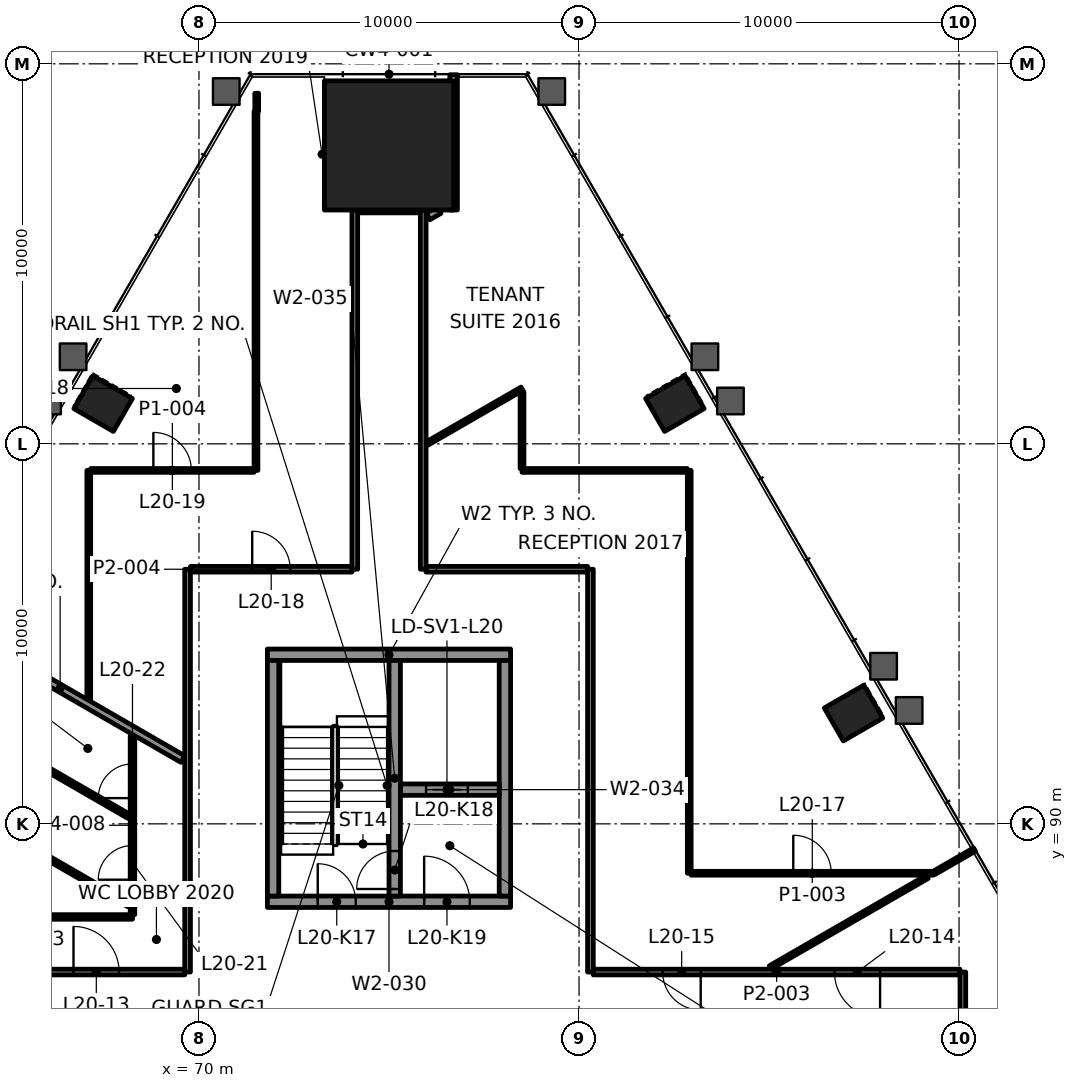
"""IFC4 building model, lengths in metres.
Left out: names, types, materials, properties, quantities, classifications, styles, units other than length and angle.
Written with IfcOpenShell. Run it as: python <this file> out.ifc"""

import sys

from ifc_helpers import new_model, si_unit, direction, frame, frame_2d, origin, origin_2d, place, context, subcontext, project, spatial, rectangle, extrude, element, fill, save


model = new_model("IFC4")
c1 = context("Model", 3, precision=1e-05, world=origin(), true_north=direction((0.0, 1.0)))
c2 = subcontext(c1, "Body", "Model", "MODEL_VIEW")
j1 = project(units=[si_unit("LENGTHUNIT", "METRE"), si_unit("PLANEANGLEUNIT", "RADIAN")], contexts=[c1])
p1 = place(None, origin())
s1 = spatial("IfcSite", under=j1, at=p1, CompositionType="ELEMENT")
p2 = place(p1, origin())
s2 = spatial("IfcBuilding", under=s1, at=p2, CompositionType="ELEMENT")
p3 = place(p2, frame((0.0, 0.0, 90.4)))
s3 = spatial("IfcBuildingStorey", under=s2, at=p3, CompositionType="ELEMENT", Elevation=90.4)
p4 = place(p3, frame((75.0, 107.853, 0.0), z_axis=(0.0, 0.0, 1.0), x_axis=(-1.0, 0.0, 0.0)))
e1 = element("IfcColumn", 1, at=p4, inside=s3, PredefinedType="COLUMN", context=c2, shape_type="SweptSolid", body=[
    extrude(rectangle(XDim=3.4, YDim=3.4, at=origin_2d()), origin(), (0.0, 0.0, 1.0), 4.2),
])
for number, where, z_axis, x_axis in (
    (2, (87.224, 92.916, -0.0), (0.0, 0.0, 1.0), (-0.5, 0.866, 0.0)),
    (3, (82.522, 101.059, -0.0), (0.0, 0.0, 1.0), (-0.5, 0.866, 0.0)),
    (4, (67.478, 101.059, -0.0), (0.0, 0.0, 1.0), (-0.5, -0.866, 0.0)),
):
    element("IfcColumn", number, at=place(p3, frame(where, z_axis=z_axis, x_axis=x_axis)), inside=s3, PredefinedType="COLUMN", context=c2, shape_type="SweptSolid", body=[
        extrude(rectangle(XDim=1.0, YDim=1.2, at=origin_2d()), origin(), (0.0, 0.0, 1.0), 4.2),
    ])
p5 = place(p3, frame((71.8, 87.95, 0.0), z_axis=(0.0, 0.0, 1.0), x_axis=(1.0, 0.0, 0.0)))
e5 = element("IfcWall", 5, at=p5, inside=s3, PredefinedType="SHEAR", context=c2, shape_type="SweptSolid", body=[
    extrude(rectangle(XDim=6.4, YDim=0.3, at=frame_2d((3.2, 0.0))), origin(), (0.0, 0.0, 1.0), 4.0),
])
p6 = place(p5, frame((1.325, 0.0, 0.0)))
e6 = element("IfcOpeningElement", 6, at=p6, cuts=e5, PredefinedType="OPENING", context=c2, shape_type="SweptSolid", body=[
    extrude(rectangle(XDim=1.0, YDim=2.1, at=frame_2d((0.5, 1.05))), frame((0.0, 0.16, 0.0), z_axis=(0.0, -1.0, 0.0), x_axis=(1.0, 0.0, 0.0)), (0.0, 0.0, 1.0), 0.32),
])
p7 = place(p5, frame((4.125, 0.0, 0.0)))
e7 = element("IfcOpeningElement", 7, at=p7, cuts=e5, PredefinedType="OPENING", context=c2, shape_type="SweptSolid", body=[
    extrude(rectangle(XDim=1.2, YDim=2.1, at=frame_2d((0.6, 1.05))), frame((0.0, 0.16, 0.0), z_axis=(0.0, -1.0, 0.0), x_axis=(1.0, 0.0, 0.0)), (0.0, 0.0, 1.0), 0.32),
])
p8 = place(p3, frame((71.8, 94.45, 0.0), z_axis=(0.0, 0.0, 1.0), x_axis=(1.0, 0.0, 0.0)))
e8 = element("IfcWall", 8, at=p8, inside=s3, PredefinedType="SHEAR", context=c2, shape_type="SweptSolid", body=[
    extrude(rectangle(XDim=6.4, YDim=0.3, at=frame_2d((3.2, 0.0))), origin(), (0.0, 0.0, 1.0), 4.0),
])
for number, where, z_axis, x_axis in (
    (9, (71.95, 88.1, 0.0), (0.0, 0.0, 1.0), (0.0, 1.0, 0.0)),
    (10, (78.05, 88.1, 0.0), (0.0, 0.0, 1.0), (0.0, 1.0, 0.0)),
):
    element("IfcWall", number, at=place(p3, frame(where, z_axis=z_axis, x_axis=x_axis)), inside=s3, PredefinedType="SHEAR", context=c2, shape_type="SweptSolid", body=[
        extrude(rectangle(XDim=6.2, YDim=0.3, at=frame_2d((3.1, 0.0))), origin(), (0.0, 0.0, 1.0), 4.0),
    ])
p9 = place(p3, frame((75.3, 90.9, 0.0), z_axis=(0.0, 0.0, 1.0), x_axis=(1.0, 0.0, 0.0)))
e11 = element("IfcWall", 11, at=p9, inside=s3, PredefinedType="SHEAR", context=c2, shape_type="SweptSolid", body=[
    extrude(rectangle(XDim=2.6, YDim=0.3, at=frame_2d((1.3, 0.0))), origin(), (0.0, 0.0, 1.0), 4.0),
])
p10 = place(p9, frame((0.675, 0.0, 0.0)))
e12 = element("IfcOpeningElement", 12, at=p10, cuts=e11, PredefinedType="OPENING", context=c2, shape_type="SweptSolid", body=[
    extrude(rectangle(XDim=1.1, YDim=2.1, at=frame_2d((0.55, 1.05))), frame((0.0, 0.16, 0.0), z_axis=(0.0, -1.0, 0.0), x_axis=(1.0, 0.0, 0.0)), (0.0, 0.0, 1.0), 0.32),
])
p11 = place(p3, frame((75.15, 88.1, 0.0), z_axis=(0.0, 0.0, 1.0), x_axis=(0.0, 1.0, 0.0)))
e13 = element("IfcWall", 13, at=p11, inside=s3, PredefinedType="SHEAR", context=c2, shape_type="SweptSolid", body=[
    extrude(rectangle(XDim=6.2, YDim=0.3, at=frame_2d((3.1, 0.0))), origin(), (0.0, 0.0, 1.0), 4.0),
])
p12 = place(p11, frame((0.185, 0.0, 0.0)))
e14 = element("IfcOpeningElement", 14, at=p12, cuts=e13, PredefinedType="OPENING", context=c2, shape_type="SweptSolid", body=[
    extrude(rectangle(XDim=1.0, YDim=2.1, at=frame_2d((0.5, 1.05))), frame((0.0, 0.16, 0.0), z_axis=(0.0, -1.0, 0.0), x_axis=(1.0, 0.0, 0.0)), (0.0, 0.0, 1.0), 0.32),
])
p13 = place(p3, frame((59.976, 86.1, 0.0), z_axis=(0.0, 0.0, 1.0), x_axis=(1.0, 0.0, 0.0)))
e15 = element("IfcWall", 15, at=p13, inside=s3, PredefinedType="PARTITIONING", context=c2, shape_type="SweptSolid", body=[
    extrude(rectangle(XDim=9.649, YDim=0.15, at=frame_2d((4.825, 0.0))), origin(), (0.0, 0.0, 1.0), 3.4),
])
p14 = place(p13, frame((2.252, 0.0, 0.0)))
e16 = element("IfcOpeningElement", 16, at=p14, cuts=e15, PredefinedType="OPENING", context=c2, shape_type="SweptSolid", body=[
    extrude(rectangle(XDim=0.9, YDim=2.1, at=frame_2d((0.45, 1.05))), frame((0.0, 0.085, 0.0), z_axis=(0.0, -1.0, 0.0), x_axis=(1.0, 0.0, 0.0)), (0.0, 0.0, 1.0), 0.17),
])
p15 = place(p13, frame((6.723, 0.0, 0.0)))
e17 = element("IfcOpeningElement", 17, at=p15, cuts=e15, PredefinedType="OPENING", context=c2, shape_type="SweptSolid", body=[
    extrude(rectangle(XDim=1.2, YDim=2.1, at=frame_2d((0.6, 1.05))), frame((0.0, 0.085, 0.0), z_axis=(0.0, -1.0, 0.0), x_axis=(1.0, 0.0, 0.0)), (0.0, 0.0, 1.0), 0.17),
])
p16 = place(p3, frame((90.024, 86.1, 0.0), z_axis=(0.0, 0.0, 1.0), x_axis=(-1.0, 0.0, 0.0)))
e18 = element("IfcWall", 18, at=p16, inside=s3, PredefinedType="PARTITIONING", context=c2, shape_type="SweptSolid", body=[
    extrude(rectangle(XDim=9.649, YDim=0.15, at=frame_2d((4.825, 0.0))), origin(), (0.0, 0.0, 1.0), 3.4),
])
p17 = place(p16, frame((2.103, 0.0, 0.0)))
e19 = element("IfcOpeningElement", 19, at=p17, cuts=e18, PredefinedType="OPENING", context=c2, shape_type="SweptSolid", body=[
    extrude(rectangle(XDim=1.2, YDim=2.1, at=frame_2d((0.6, 1.05))), frame((0.0, 0.085, 0.0), z_axis=(0.0, -1.0, 0.0), x_axis=(1.0, 0.0, 0.0)), (0.0, 0.0, 1.0), 0.17),
])
p18 = place(p16, frame((6.823, 0.0, 0.0)))
e20 = element("IfcOpeningElement", 20, at=p18, cuts=e18, PredefinedType="OPENING", context=c2, shape_type="SweptSolid", body=[
    extrude(rectangle(XDim=1.0, YDim=2.1, at=frame_2d((0.5, 1.05))), frame((0.0, 0.085, 0.0), z_axis=(0.0, -1.0, 0.0), x_axis=(1.0, 0.0, 0.0)), (0.0, 0.0, 1.0), 0.17),
])
p19 = place(p3, frame((62.896, 87.55, 0.0), z_axis=(0.0, 0.0, 1.0), x_axis=(1.0, 0.0, 0.0)))
e21 = element("IfcWall", 21, at=p19, inside=s3, PredefinedType="PARTITIONING", context=c2, shape_type="SweptSolid", body=[
    extrude(rectangle(XDim=5.354, YDim=0.12, at=frame_2d((2.677, 0.0))), origin(), (0.0, 0.0, 1.0), 3.4),
])
p20 = place(p19, frame((2.177, 0.0, 0.0)))
e22 = element("IfcOpeningElement", 22, at=p20, cuts=e21, PredefinedType="OPENING", context=c2, shape_type="SweptSolid", body=[
    extrude(rectangle(XDim=1.0, YDim=2.1, at=frame_2d((0.5, 1.05))), frame((0.0, 0.07, 0.0), z_axis=(0.0, -1.0, 0.0), x_axis=(1.0, 0.0, 0.0)), (0.0, 0.0, 1.0), 0.14),
])
p21 = place(p3, frame((82.95, 88.7, 0.0), z_axis=(0.0, 0.0, 1.0), x_axis=(1.0, 0.0, 0.0)))
e23 = element("IfcWall", 23, at=p21, inside=s3, PredefinedType="PARTITIONING", context=c2, shape_type="SweptSolid", body=[
    extrude(rectangle(XDim=6.376, YDim=0.1, at=frame_2d((3.188, 0.0))), origin(), (0.0, 0.0, 1.0), 3.4),
])
p22 = place(p21, frame((2.688, 0.0, 0.0)))
e24 = element("IfcOpeningElement", 24, at=p22, cuts=e23, PredefinedType="OPENING", context=c2, shape_type="SweptSolid", body=[
    extrude(rectangle(XDim=1.0, YDim=2.1, at=frame_2d((0.5, 1.05))), frame((0.0, 0.06, 0.0), z_axis=(0.0, -1.0, 0.0), x_axis=(1.0, 0.0, 0.0)), (0.0, 0.0, 1.0), 0.12),
])
p23 = place(p3, frame((69.775, 96.7, 0.0), z_axis=(0.0, 0.0, 1.0), x_axis=(1.0, 0.0, 0.0)))
e25 = element("IfcWall", 25, at=p23, inside=s3, PredefinedType="PARTITIONING", context=c2, shape_type="SweptSolid", body=[
    extrude(rectangle(XDim=4.25, YDim=0.15, at=frame_2d((2.125, 0.0))), origin(), (0.0, 0.0, 1.0), 3.4),
])
p24 = place(p23, frame((1.625, 0.0, 0.0)))
e26 = element("IfcOpeningElement", 26, at=p24, cuts=e25, PredefinedType="OPENING", context=c2, shape_type="SweptSolid", body=[
    extrude(rectangle(XDim=1.0, YDim=2.1, at=frame_2d((0.5, 1.05))), frame((0.0, 0.085, 0.0), z_axis=(0.0, -1.0, 0.0), x_axis=(1.0, 0.0, 0.0)), (0.0, 0.0, 1.0), 0.17),
])
p25 = place(p3, frame((75.975, 96.7, 0.0), z_axis=(0.0, 0.0, 1.0), x_axis=(1.0, 0.0, 0.0)))
e27 = element("IfcWall", 27, at=p25, inside=s3, PredefinedType="PARTITIONING", context=c2, shape_type="SweptSolid", body=[
    extrude(rectangle(XDim=4.25, YDim=0.15, at=frame_2d((2.125, 0.0))), origin(), (0.0, 0.0, 1.0), 3.4),
])
p26 = place(p3, frame((67.15, 99.3, 0.0), z_axis=(0.0, 0.0, 1.0), x_axis=(1.0, 0.0, 0.0)))
e28 = element("IfcWall", 28, at=p26, inside=s3, PredefinedType="PARTITIONING", context=c2, shape_type="SweptSolid", body=[
    extrude(rectangle(XDim=4.3, YDim=0.1, at=frame_2d((2.15, 0.0))), origin(), (0.0, 0.0, 1.0), 3.4),
])
p27 = place(p26, frame((1.65, 0.0, 0.0)))
e29 = element("IfcOpeningElement", 29, at=p27, cuts=e28, PredefinedType="OPENING", context=c2, shape_type="SweptSolid", body=[
    extrude(rectangle(XDim=1.0, YDim=2.1, at=frame_2d((0.5, 1.05))), frame((0.0, 0.06, 0.0), z_axis=(0.0, -1.0, 0.0), x_axis=(1.0, 0.0, 0.0)), (0.0, 0.0, 1.0), 0.12),
])
p28 = place(p3, frame((78.5, 99.3, 0.0), z_axis=(0.0, 0.0, 1.0), x_axis=(1.0, 0.0, 0.0)))
e30 = element("IfcWall", 30, at=p28, inside=s3, PredefinedType="PARTITIONING", context=c2, shape_type="SweptSolid", body=[
    extrude(rectangle(XDim=4.35, YDim=0.1, at=frame_2d((2.175, 0.0))), origin(), (0.0, 0.0, 1.0), 3.4),
])
p29 = place(p3, frame((74.176, 106.153, 0.0), z_axis=(0.0, 0.0, 1.0), x_axis=(1.0, 0.0, 0.0)))
e31 = element("IfcWall", 31, at=p29, inside=s3, PredefinedType="PARTITIONING", context=c2, shape_type="SweptSolid", body=[
    extrude(rectangle(XDim=1.649, YDim=0.15, at=frame_2d((0.824, 0.0))), origin(), (0.0, 0.0, 1.0), 3.397),
])
p30 = place(p3, frame((85.03, 86.22, 0.0), z_axis=(0.0, 0.0, 1.0), x_axis=(0.86602800421, 0.499995495904, 0.0)))
e32 = element("IfcWall", 32, at=p30, inside=s3, PredefinedType="PARTITIONING", context=c2, shape_type="SweptSolid", body=[
    extrude(rectangle(XDim=4.773, YDim=0.1, at=frame_2d((2.386, 0.0))), origin(), (0.0, 0.0, 1.0), 3.4),
])
p31 = place(p3, frame((76.001, 100.008, 0.0), z_axis=(0.0, 0.0, 1.0), x_axis=(0.866016514357, 0.500015396624, 0.0)))
e33 = element("IfcWall", 33, at=p31, inside=s3, PredefinedType="PARTITIONING", context=c2, shape_type="SweptSolid", body=[
    extrude(rectangle(XDim=2.886, YDim=0.1, at=frame_2d((1.443, 0.0))), origin(), (0.0, 0.0, 1.0), 3.4),
])
p32 = place(p3, frame((76.028, 105.984, 0.0), z_axis=(0.0, 0.0, 1.0), x_axis=(0.866137275136, 0.499806183056, 0.0)))
e34 = element("IfcWall", 34, at=p32, inside=s3, PredefinedType="PARTITIONING", context=c2, shape_type="SweptSolid", body=[
    extrude(rectangle(XDim=0.337, YDim=0.2, at=frame_2d((0.168, 0.0))), origin(), (0.0, 0.0, 1.0), 3.4),
])
p33 = place(p3, frame((90.1, 67.321, 0.0), z_axis=(0.0, 0.0, 1.0), x_axis=(0.0, 1.0, 0.0)))
e35 = element("IfcWall", 35, at=p33, inside=s3, PredefinedType="PARTITIONING", context=c2, shape_type="SweptSolid", body=[
    extrude(rectangle(XDim=18.778, YDim=0.15, at=frame_2d((9.389, 0.0))), origin(), (0.0, 0.0, 1.0), 3.4),
])
p34 = place(p3, frame((82.9, 88.7, 0.0), z_axis=(0.0, 0.0, 1.0), x_axis=(0.0, 1.0, 0.0)))
e36 = element("IfcWall", 36, at=p34, inside=s3, PredefinedType="PARTITIONING", context=c2, shape_type="SweptSolid", body=[
    extrude(rectangle(XDim=10.6, YDim=0.1, at=frame_2d((5.3, 0.0))), origin(), (0.0, 0.0, 1.0), 3.322),
])
p35 = place(p3, frame((80.3, 86.1, 0.0), z_axis=(0.0, 0.0, 1.0), x_axis=(0.0, 1.0, 0.0)))
e37 = element("IfcWall", 37, at=p35, inside=s3, PredefinedType="PARTITIONING", context=c2, shape_type="SweptSolid", body=[
    extrude(rectangle(XDim=10.6, YDim=0.15, at=frame_2d((5.3, 0.0))), origin(), (0.0, 0.0, 1.0), 3.322),
])
p36 = place(p3, frame((78.5, 99.35, 0.0), z_axis=(0.0, 0.0, 1.0), x_axis=(0.0, 1.0, 0.0)))
e38 = element("IfcWall", 38, at=p36, inside=s3, PredefinedType="PARTITIONING", context=c2, shape_type="SweptSolid", body=[
    extrude(rectangle(XDim=2.014, YDim=0.1, at=frame_2d((1.007, 0.0))), origin(), (0.0, 0.0, 1.0), 3.4),
])
p37 = place(p3, frame((76.7, 106.153, 0.0), z_axis=(0.0, 0.0, 1.0), x_axis=(0.0, 1.0, 0.0)))
e39 = element("IfcWall", 39, at=p37, inside=s3, PredefinedType="PARTITIONING", context=c2, shape_type="SweptSolid", body=[
    extrude(rectangle(XDim=3.559, YDim=0.2, at=frame_2d((1.78, 0.0))), origin(), (0.0, 0.0, 1.0), 3.4),
])
for number, where, z_axis, x_axis in (
    (40, (75.9, 96.7, 0.0), (0.0, 0.0, 1.0), (0.0, 1.0, 0.0)),
    (41, (74.1, 96.7, 0.0), (0.0, 0.0, 1.0), (0.0, 1.0, 0.0)),
):
    element("IfcWall", number, at=place(p3, frame(where, z_axis=z_axis, x_axis=x_axis)), inside=s3, PredefinedType="PARTITIONING", context=c2, shape_type="SweptSolid", body=[
        extrude(rectangle(XDim=9.452, YDim=0.15, at=frame_2d((4.726, 0.0))), origin(), (0.0, 0.0, 1.0), 3.4),
    ])
p38 = place(p3, frame((71.519, 108.753, 0.0), z_axis=(0.0, 0.0, 1.0), x_axis=(0.0, 1.0, 0.0)))
e42 = element("IfcWall", 42, at=p38, inside=s3, PredefinedType="PARTITIONING", context=c2, shape_type="SweptSolid", body=[
    extrude(rectangle(XDim=0.473, YDim=0.1, at=frame_2d((0.236, 0.0))), origin(), (0.0, 0.0, 1.0), 3.4),
])
p39 = place(p3, frame((71.5, 99.301, 0.0), z_axis=(0.0, 0.0, 1.0), x_axis=(0.0, 1.0, 0.0)))
e43 = element("IfcWall", 43, at=p39, inside=s3, PredefinedType="PARTITIONING", context=c2, shape_type="SweptSolid", body=[
    extrude(rectangle(XDim=9.452, YDim=0.1, at=frame_2d((4.726, 0.0))), origin(), (0.0, 0.0, 1.0), 3.4),
])
p40 = place(p3, frame((69.7, 86.1, 0.0), z_axis=(0.0, 0.0, 1.0), x_axis=(0.0, 1.0, 0.0)))
e44 = element("IfcWall", 44, at=p40, inside=s3, PredefinedType="PARTITIONING", context=c2, shape_type="SweptSolid", body=[
    extrude(rectangle(XDim=10.599, YDim=0.15, at=frame_2d((5.3, 0.0))), origin(), (0.0, 0.0, 1.0), 3.322),
])
p41 = place(p3, frame((68.25, 87.61, 0.0), z_axis=(0.0, 0.0, 1.0), x_axis=(0.0, 1.0, 0.0)))
e45 = element("IfcWall", 45, at=p41, inside=s3, PredefinedType="PARTITIONING", context=c2, shape_type="SweptSolid", body=[
    extrude(rectangle(XDim=4.704, YDim=0.12, at=frame_2d((2.352, 0.0))), origin(), (0.0, 0.0, 1.0), 3.322),
])
p42 = place(p41, frame((0.92, 0.0, 0.0)))
e46 = element("IfcOpeningElement", 46, at=p42, cuts=e45, PredefinedType="OPENING", context=c2, shape_type="SweptSolid", body=[
    extrude(rectangle(XDim=0.9, YDim=2.1, at=frame_2d((0.45, 1.05))), frame((0.0, 0.07, 0.0), z_axis=(0.0, -1.0, 0.0), x_axis=(1.0, 0.0, 0.0)), (0.0, 0.0, 1.0), 0.14),
])
p43 = place(p41, frame((3.067, 0.0, 0.0)))
e47 = element("IfcOpeningElement", 47, at=p43, cuts=e45, PredefinedType="OPENING", context=c2, shape_type="SweptSolid", body=[
    extrude(rectangle(XDim=0.9, YDim=2.1, at=frame_2d((0.45, 1.05))), frame((0.0, 0.07, 0.0), z_axis=(0.0, -1.0, 0.0), x_axis=(1.0, 0.0, 0.0)), (0.0, 0.0, 1.0), 0.14),
])
p44 = place(p3, frame((67.1, 93.279, 0.0), z_axis=(0.0, 0.0, 1.0), x_axis=(0.0, 1.0, 0.0)))
e48 = element("IfcWall", 48, at=p44, inside=s3, PredefinedType="PARTITIONING", context=c2, shape_type="SweptSolid", body=[
    extrude(rectangle(XDim=6.021, YDim=0.1, at=frame_2d((3.01, 0.0))), origin(), (0.0, 0.0, 1.0), 3.4),
])
p45 = place(p3, frame((69.573, 91.706, 0.0), z_axis=(0.0, 0.0, 1.0), x_axis=(-0.866024622953, 0.500001352437, 0.0)))
e49 = element("IfcWall", 49, at=p45, inside=s3, PredefinedType="PARTITIONING", context=c2, shape_type="SweptSolid", body=[
    extrude(rectangle(XDim=7.451, YDim=0.2, at=frame_2d((3.726, 0.0))), origin(), (0.0, 0.0, 1.0), 3.165),
])
p46 = place(p3, frame((68.155, 90.198, 0.0), z_axis=(0.0, 0.0, 1.0), x_axis=(-0.866024771944, 0.500001094379, 0.0)))
e50 = element("IfcWall", 50, at=p46, inside=s3, PredefinedType="PARTITIONING", context=c2, shape_type="SweptSolid", body=[
    extrude(rectangle(XDim=2.604, YDim=0.12, at=frame_2d((1.302, 0.0))), origin(), (0.0, 0.0, 1.0), 3.4),
])
p47 = place(p3, frame((68.155, 87.871, 0.0), z_axis=(0.0, 0.0, 1.0), x_axis=(-0.866041060244, 0.499972881236, 0.0)))
e51 = element("IfcWall", 51, at=p47, inside=s3, PredefinedType="PARTITIONING", context=c2, shape_type="SweptSolid", body=[
    extrude(rectangle(XDim=3.938, YDim=0.12, at=frame_2d((1.969, 0.0))), origin(), (0.0, 0.0, 1.0), 3.4),
])
p48 = place(p3, frame((89.347, 88.713, 0.0), z_axis=(0.0, 0.0, 1.0), x_axis=(0.866109108303, 0.499854991488, 0.0)))
e52 = element("IfcWall", 52, at=p48, inside=s3, PredefinedType="PARTITIONING", context=c2, shape_type="SweptSolid", body=[
    extrude(rectangle(XDim=1.222, YDim=0.1, at=frame_2d((0.611, 0.0))), origin(), (0.0, 0.0, 1.0), 3.165),
])
p49 = place(p15, origin())
e53 = element("IfcDoor", 53, at=p49, inside=s3, OperationType="DOUBLE_DOOR_SINGLE_SWING", PredefinedType="DOOR", context=c2, shape_type="SweptSolid", body=[
    extrude(rectangle(XDim=1.2, YDim=2.1, at=frame_2d((0.6, 1.05))), frame((0.0, 0.025, 0.0), z_axis=(0.0, -1.0, 0.0), x_axis=(1.0, 0.0, 0.0)), (0.0, 0.0, 1.0), 0.05),
])
fill(e17, e53)
p50 = place(p17, origin())
e54 = element("IfcDoor", 54, at=p50, inside=s3, OperationType="DOUBLE_DOOR_SINGLE_SWING", PredefinedType="DOOR", context=c2, shape_type="SweptSolid", body=[
    extrude(rectangle(XDim=1.2, YDim=2.1, at=frame_2d((0.6, 1.05))), frame((0.0, 0.025, 0.0), z_axis=(0.0, -1.0, 0.0), x_axis=(1.0, 0.0, 0.0)), (0.0, 0.0, 1.0), 0.05),
])
fill(e19, e54)
p51 = place(p18, origin())
e55 = element("IfcDoor", 55, at=p51, inside=s3, OperationType="SINGLE_SWING_LEFT", PredefinedType="DOOR", context=c2, shape_type="SweptSolid", body=[
    extrude(rectangle(XDim=1.0, YDim=2.1, at=frame_2d((0.5, 1.05))), frame((0.0, 0.025, 0.0), z_axis=(0.0, -1.0, 0.0), x_axis=(1.0, 0.0, 0.0)), (0.0, 0.0, 1.0), 0.05),
])
fill(e20, e55)
p52 = place(p22, origin())
e56 = element("IfcDoor", 56, at=p52, inside=s3, OperationType="SINGLE_SWING_LEFT", PredefinedType="DOOR", context=c2, shape_type="SweptSolid", body=[
    extrude(rectangle(XDim=1.0, YDim=2.1, at=frame_2d((0.5, 1.05))), frame((0.0, 0.025, 0.0), z_axis=(0.0, -1.0, 0.0), x_axis=(1.0, 0.0, 0.0)), (0.0, 0.0, 1.0), 0.05),
])
fill(e24, e56)
p53 = place(p24, origin())
e57 = element("IfcDoor", 57, at=p53, inside=s3, OperationType="SINGLE_SWING_RIGHT", PredefinedType="DOOR", context=c2, shape_type="SweptSolid", body=[
    extrude(rectangle(XDim=1.0, YDim=2.1, at=frame_2d((0.5, 1.05))), frame((0.0, 0.025, 0.0), z_axis=(0.0, -1.0, 0.0), x_axis=(1.0, 0.0, 0.0)), (0.0, 0.0, 1.0), 0.05),
])
fill(e26, e57)
p54 = place(p27, origin())
e58 = element("IfcDoor", 58, at=p54, inside=s3, OperationType="SINGLE_SWING_LEFT", PredefinedType="DOOR", context=c2, shape_type="SweptSolid", body=[
    extrude(rectangle(XDim=1.0, YDim=2.1, at=frame_2d((0.5, 1.05))), frame((0.0, 0.025, 0.0), z_axis=(0.0, -1.0, 0.0), x_axis=(1.0, 0.0, 0.0)), (0.0, 0.0, 1.0), 0.05),
])
fill(e29, e58)
p55 = place(p42, origin())
e59 = element("IfcDoor", 59, at=p55, inside=s3, OperationType="SINGLE_SWING_LEFT", PredefinedType="DOOR", context=c2, shape_type="SweptSolid", body=[
    extrude(rectangle(XDim=0.9, YDim=2.1, at=frame_2d((0.45, 1.05))), frame((0.0, 0.025, 0.0), z_axis=(0.0, -1.0, 0.0), x_axis=(1.0, 0.0, 0.0)), (0.0, 0.0, 1.0), 0.05),
])
fill(e46, e59)
p56 = place(p43, origin())
e60 = element("IfcDoor", 60, at=p56, inside=s3, OperationType="SINGLE_SWING_RIGHT", PredefinedType="DOOR", context=c2, shape_type="SweptSolid", body=[
    extrude(rectangle(XDim=0.9, YDim=2.1, at=frame_2d((0.45, 1.05))), frame((0.0, 0.025, 0.0), z_axis=(0.0, -1.0, 0.0), x_axis=(1.0, 0.0, 0.0)), (0.0, 0.0, 1.0), 0.05),
])
fill(e47, e60)
p57 = place(p10, origin())
e61 = element("IfcDoor", 61, at=p57, inside=s3, OperationType="DOUBLE_DOOR_SLIDING", PredefinedType="DOOR", context=c2, shape_type="SweptSolid", body=[
    extrude(rectangle(XDim=1.1, YDim=2.1, at=frame_2d((0.55, 1.05))), frame((0.0, 0.025, 0.0), z_axis=(0.0, -1.0, 0.0), x_axis=(1.0, 0.0, 0.0)), (0.0, 0.0, 1.0), 0.05),
])
fill(e12, e61)
p58 = place(p6, origin())
e62 = element("IfcDoor", 62, at=p58, inside=s3, OperationType="SINGLE_SWING_RIGHT", PredefinedType="DOOR", context=c2, shape_type="SweptSolid", body=[
    extrude(rectangle(XDim=1.0, YDim=2.1, at=frame_2d((0.5, 1.05))), frame((0.0, 0.025, 0.0), z_axis=(0.0, -1.0, 0.0), x_axis=(1.0, 0.0, 0.0)), (0.0, 0.0, 1.0), 0.05),
])
fill(e6, e62)
p59 = place(p12, origin())
e63 = element("IfcDoor", 63, at=p59, inside=s3, OperationType="SINGLE_SWING_LEFT", PredefinedType="DOOR", context=c2, shape_type="SweptSolid", body=[
    extrude(rectangle(XDim=1.0, YDim=2.1, at=frame_2d((0.5, 1.05))), frame((0.0, 0.025, 0.0), z_axis=(0.0, -1.0, 0.0), x_axis=(1.0, 0.0, 0.0)), (0.0, 0.0, 1.0), 0.05),
])
fill(e14, e63)
p60 = place(p7, origin())
e64 = element("IfcDoor", 64, at=p60, inside=s3, OperationType="SINGLE_SWING_RIGHT", PredefinedType="DOOR", context=c2, shape_type="SweptSolid", body=[
    extrude(rectangle(XDim=1.2, YDim=2.1, at=frame_2d((0.6, 1.05))), frame((0.0, 0.025, 0.0), z_axis=(0.0, -1.0, 0.0), x_axis=(1.0, 0.0, 0.0)), (0.0, 0.0, 1.0), 0.05),
])
fill(e7, e64)
save(model, sys.argv[1])
